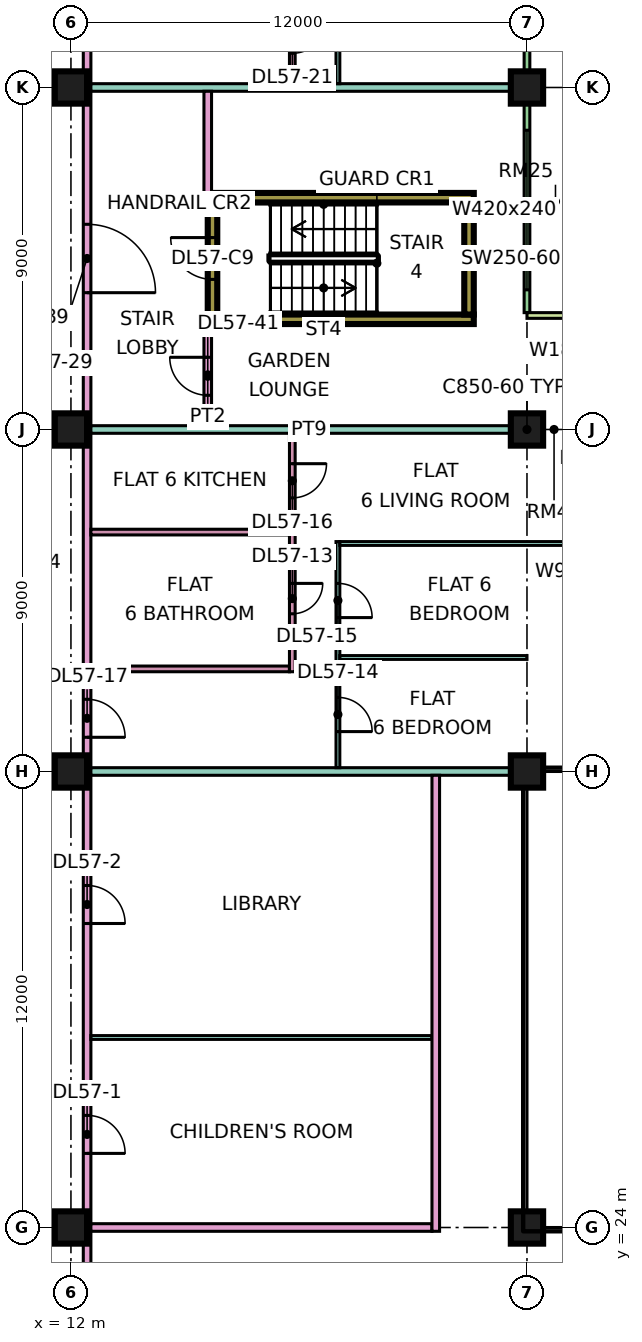
"""IFC4 building model, lengths in metres.
Left out: names, types, materials, properties, quantities, classifications, styles, units other than length and angle.
Written with IfcOpenShell. Run it as: python <this file> out.ifc"""

import sys

from ifc_helpers import new_model, si_unit, direction, frame, frame_2d, origin, origin_2d, place, context, subcontext, project, spatial, rectangle, extrude, element, fill, save


model = new_model("IFC4")
c1 = context("Model", 3, precision=1e-05, world=origin(), true_north=direction((0.0, 1.0)))
c2 = subcontext(c1, "Body", "Model", "MODEL_VIEW")
j1 = project(units=[si_unit("LENGTHUNIT", "METRE"), si_unit("PLANEANGLEUNIT", "RADIAN")], contexts=[c1])
p1 = place(None, origin())
s1 = spatial("IfcSite", under=j1, at=p1, CompositionType="ELEMENT")
p2 = place(p1, origin())
s2 = spatial("IfcBuilding", under=s1, at=p2, CompositionType="ELEMENT")
p3 = place(p2, frame((0.0, 0.0, 241.65)))
s3 = spatial("IfcBuildingStorey", under=s2, at=p3, CompositionType="ELEMENT", Elevation=241.65)
for number, where, z_axis, x_axis in (
    (1, (12.0, 24.0, 0.0), (0.0, 0.0, 1.0), (1.0, 0.0, 0.0)),
    (2, (12.0, 36.0, 0.0), (0.0, 0.0, 1.0), (1.0, 0.0, 0.0)),
    (3, (12.0, 45.0, 0.0), (0.0, 0.0, 1.0), (1.0, 0.0, 0.0)),
    (4, (12.0, 54.0, 0.0), (0.0, 0.0, 1.0), (1.0, 0.0, 0.0)),
    (5, (24.0, 24.0, 0.0), (0.0, 0.0, 1.0), (1.0, 0.0, 0.0)),
    (6, (24.0, 36.0, 0.0), (0.0, 0.0, 1.0), (1.0, 0.0, 0.0)),
    (7, (24.0, 45.0, 0.0), (0.0, 0.0, 1.0), (1.0, 0.0, 0.0)),
    (8, (24.0, 54.0, 0.0), (0.0, 0.0, 1.0), (1.0, 0.0, 0.0)),
):
    element("IfcColumn", number, at=place(p3, frame(where, z_axis=z_axis, x_axis=x_axis)), inside=s3, PredefinedType="COLUMN", context=c2, shape_type="SweptSolid", body=[
        extrude(rectangle(XDim=0.85, YDim=0.85, at=origin_2d()), origin(), (0.0, 0.0, 1.0), 3.75),
    ])
for number, where, z_axis, x_axis in (
    (9, (15.6, 47.9, 0.0), (0.0, 0.0, 1.0), (1.0, 0.0, 0.0)),
    (10, (15.6, 51.1, 0.0), (0.0, 0.0, 1.0), (1.0, 0.0, 0.0)),
):
    element("IfcWall", number, at=place(p3, frame(where, z_axis=z_axis, x_axis=x_axis)), inside=s3, PredefinedType="SHEAR", context=c2, shape_type="SweptSolid", body=[
        extrude(rectangle(XDim=7.0, YDim=0.25, at=frame_2d((3.5, 0.0))), origin(), (0.0, 0.0, 1.0), 3.75),
    ])
p4 = place(p3, frame((15.725, 48.025, 0.0), z_axis=(0.0, 0.0, 1.0), x_axis=(0.0, 1.0, 0.0)))
e11 = element("IfcWall", 11, at=p4, inside=s3, PredefinedType="SHEAR", context=c2, shape_type="SweptSolid", body=[
    extrude(rectangle(XDim=2.95, YDim=0.25, at=frame_2d((1.475, 0.0))), origin(), (0.0, 0.0, 1.0), 3.75),
])
p5 = place(p4, frame((0.925, 0.0, 0.0)))
e12 = element("IfcOpeningElement", 12, at=p5, cuts=e11, PredefinedType="OPENING", context=c2, shape_type="SweptSolid", body=[
    extrude(rectangle(XDim=1.1, YDim=2.2, at=frame_2d((0.55, 1.1))), frame((0.0, 0.135, 0.0), z_axis=(0.0, -1.0, 0.0), x_axis=(1.0, 0.0, 0.0)), (0.0, 0.0, 1.0), 0.27),
])
p6 = place(p3, frame((22.475, 48.025, 0.0), z_axis=(0.0, 0.0, 1.0), x_axis=(0.0, 1.0, 0.0)))
e13 = element("IfcWall", 13, at=p6, inside=s3, PredefinedType="SHEAR", context=c2, shape_type="SweptSolid", body=[
    extrude(rectangle(XDim=2.95, YDim=0.25, at=frame_2d((1.475, 0.0))), origin(), (0.0, 0.0, 1.0), 3.75),
])
p7 = place(p3, frame((24.0, 48.075, 0.0), z_axis=(0.0, 0.0, 1.0), x_axis=(0.0, 1.0, 0.0)))
e14 = element("IfcWall", 14, at=p7, inside=s3, PredefinedType="SOLIDWALL", context=c2, shape_type="SweptSolid", body=[
    extrude(rectangle(XDim=13.35, YDim=0.15, at=frame_2d((6.675, 0.0))), origin(), (0.0, 0.0, 1.0), 3.35),
])
p8 = place(p7, frame((0.6, 0.0, 0.45)))
e15 = element("IfcOpeningElement", 15, at=p8, cuts=e14, PredefinedType="OPENING", context=c2, shape_type="SweptSolid", body=[
    extrude(rectangle(XDim=4.2, YDim=2.4, at=frame_2d((2.1, 1.2))), frame((0.0, 0.085, 0.0), z_axis=(0.0, -1.0, 0.0), x_axis=(1.0, 0.0, 0.0)), (0.0, 0.0, 1.0), 0.17),
])
p9 = place(p7, frame((7.087, 0.0, 0.0)))
e16 = element("IfcOpeningElement", 16, at=p9, cuts=e14, PredefinedType="OPENING", context=c2, shape_type="SweptSolid", body=[
    extrude(rectangle(XDim=1.2, YDim=2.4, at=frame_2d((0.6, 1.2))), frame((0.0, 0.085, 0.0), z_axis=(0.0, -1.0, 0.0), x_axis=(1.0, 0.0, 0.0)), (0.0, 0.0, 1.0), 0.17),
])
p10 = place(p7, frame((9.525, 0.0, 0.45)))
e17 = element("IfcOpeningElement", 17, at=p10, cuts=e14, PredefinedType="OPENING", context=c2, shape_type="SweptSolid", body=[
    extrude(rectangle(XDim=1.8, YDim=2.4, at=frame_2d((0.9, 1.2))), frame((0.0, 0.085, 0.0), z_axis=(0.0, -1.0, 0.0), x_axis=(1.0, 0.0, 0.0)), (0.0, 0.0, 1.0), 0.17),
])
p11 = place(p7, frame((12.188, 0.0, 0.45)))
e18 = element("IfcOpeningElement", 18, at=p11, cuts=e14, PredefinedType="OPENING", context=c2, shape_type="SweptSolid", body=[
    extrude(rectangle(XDim=0.9, YDim=2.4, at=frame_2d((0.45, 1.2))), frame((0.0, 0.085, 0.0), z_axis=(0.0, -1.0, 0.0), x_axis=(1.0, 0.0, 0.0)), (0.0, 0.0, 1.0), 0.17),
])
p12 = place(p3, frame((25.5, 48.0, 0.0), z_axis=(0.0, 0.0, 1.0), x_axis=(-1.0, 0.0, 0.0)))
e19 = element("IfcWall", 19, at=p12, inside=s3, PredefinedType="SOLIDWALL", context=c2, shape_type="SweptSolid", body=[
    extrude(rectangle(XDim=1.5, YDim=0.15, at=frame_2d((0.75, 0.0))), origin(), (0.0, 0.0, 1.0), 3.35),
])
p13 = place(p3, frame((12.425, 20.0, 0.0), z_axis=(0.0, 0.0, 1.0), x_axis=(0.0, 1.0, 0.0)))
e20 = element("IfcWall", 20, at=p13, inside=s3, PredefinedType="PARTITIONING", context=c2, shape_type="SweptSolid", body=[
    extrude(rectangle(XDim=43.0, YDim=0.2, at=frame_2d((21.5, 0.0))), origin(), (0.0, 0.0, 1.0), 3.35),
])
p14 = place(p13, frame((5.95, 0.0, 0.0)))
e21 = element("IfcOpeningElement", 21, at=p14, cuts=e20, PredefinedType="OPENING", context=c2, shape_type="SweptSolid", body=[
    extrude(rectangle(XDim=1.0, YDim=2.1, at=frame_2d((0.5, 1.05))), frame((0.0, 0.11, 0.0), z_axis=(0.0, -1.0, 0.0), x_axis=(1.0, 0.0, 0.0)), (0.0, 0.0, 1.0), 0.22),
])
p15 = place(p13, frame((12.0, 0.0, 0.0)))
e22 = element("IfcOpeningElement", 22, at=p15, cuts=e20, PredefinedType="OPENING", context=c2, shape_type="SweptSolid", body=[
    extrude(rectangle(XDim=1.0, YDim=2.1, at=frame_2d((0.5, 1.05))), frame((0.0, 0.11, 0.0), z_axis=(0.0, -1.0, 0.0), x_axis=(1.0, 0.0, 0.0)), (0.0, 0.0, 1.0), 0.22),
])
p16 = place(p13, frame((16.9, 0.0, 0.0)))
e23 = element("IfcOpeningElement", 23, at=p16, cuts=e20, PredefinedType="OPENING", context=c2, shape_type="SweptSolid", body=[
    extrude(rectangle(XDim=1.0, YDim=2.1, at=frame_2d((0.5, 1.05))), frame((0.0, 0.11, 0.0), z_axis=(0.0, -1.0, 0.0), x_axis=(1.0, 0.0, 0.0)), (0.0, 0.0, 1.0), 0.22),
])
p17 = place(p13, frame((41.05, 0.0, 0.0)))
e24 = element("IfcOpeningElement", 24, at=p17, cuts=e20, PredefinedType="OPENING", context=c2, shape_type="SweptSolid", body=[
    extrude(rectangle(XDim=1.0, YDim=2.1, at=frame_2d((0.5, 1.05))), frame((0.0, 0.11, 0.0), z_axis=(0.0, -1.0, 0.0), x_axis=(1.0, 0.0, 0.0)), (0.0, 0.0, 1.0), 0.22),
])
p18 = place(p13, frame((1.15, 0.0, 0.0)))
e25 = element("IfcOpeningElement", 25, at=p18, cuts=e20, PredefinedType="OPENING", context=c2, shape_type="SweptSolid", body=[
    extrude(rectangle(XDim=1.8, YDim=2.1, at=frame_2d((0.9, 1.05))), frame((0.0, 0.11, 0.0), z_axis=(0.0, -1.0, 0.0), x_axis=(1.0, 0.0, 0.0)), (0.0, 0.0, 1.0), 0.22),
])
p19 = place(p13, frame((28.6, 0.0, 0.0)))
e26 = element("IfcOpeningElement", 26, at=p19, cuts=e20, PredefinedType="OPENING", context=c2, shape_type="SweptSolid", body=[
    extrude(rectangle(XDim=1.8, YDim=2.1, at=frame_2d((0.9, 1.05))), frame((0.0, 0.11, 0.0), z_axis=(0.0, -1.0, 0.0), x_axis=(1.0, 0.0, 0.0)), (0.0, 0.0, 1.0), 0.22),
])
p20 = place(p3, frame((12.525, 24.0, 0.0), z_axis=(0.0, 0.0, 1.0), x_axis=(1.0, 0.0, 0.0)))
e27 = element("IfcWall", 27, at=p20, inside=s3, PredefinedType="PARTITIONING", context=c2, shape_type="SweptSolid", body=[
    extrude(rectangle(XDim=8.975, YDim=0.2, at=frame_2d((4.488, 0.0))), origin(), (0.0, 0.0, 1.0), 3.35),
])
p21 = place(p3, frame((12.525, 29.0, 0.0), z_axis=(0.0, 0.0, 1.0), x_axis=(1.0, 0.0, 0.0)))
e28 = element("IfcWall", 28, at=p21, inside=s3, PredefinedType="PARTITIONING", context=c2, shape_type="SweptSolid", body=[
    extrude(rectangle(XDim=8.975, YDim=0.1, at=frame_2d((4.488, 0.0))), origin(), (0.0, 0.0, 1.0), 3.35),
])
p22 = place(p3, frame((12.525, 36.0, 0.0), z_axis=(0.0, 0.0, 1.0), x_axis=(1.0, 0.0, 0.0)))
e29 = element("IfcWall", 29, at=p22, inside=s3, PredefinedType="PARTITIONING", context=c2, shape_type="SweptSolid", body=[
    extrude(rectangle(XDim=11.475, YDim=0.2, at=frame_2d((5.738, 0.0))), origin(), (0.0, 0.0, 1.0), 3.35),
])
for number, where, z_axis, x_axis in (
    (30, (12.525, 38.7, 0.0), (0.0, 0.0, 1.0), (1.0, 0.0, 0.0)),
    (31, (12.525, 42.3, 0.0), (0.0, 0.0, 1.0), (1.0, 0.0, 0.0)),
):
    element("IfcWall", number, at=place(p3, frame(where, z_axis=z_axis, x_axis=x_axis)), inside=s3, PredefinedType="PARTITIONING", context=c2, shape_type="SweptSolid", body=[
        extrude(rectangle(XDim=5.225, YDim=0.15, at=frame_2d((2.613, 0.0))), origin(), (0.0, 0.0, 1.0), 3.35),
    ])
p23 = place(p3, frame((12.525, 45.0, 0.0), z_axis=(0.0, 0.0, 1.0), x_axis=(1.0, 0.0, 0.0)))
e32 = element("IfcWall", 32, at=p23, inside=s3, PredefinedType="PARTITIONING", context=c2, shape_type="SweptSolid", body=[
    extrude(rectangle(XDim=11.475, YDim=0.2, at=frame_2d((5.738, 0.0))), origin(), (0.0, 0.0, 1.0), 3.35),
])
p24 = place(p3, frame((12.525, 54.0, 0.0), z_axis=(0.0, 0.0, 1.0), x_axis=(1.0, 0.0, 0.0)))
e33 = element("IfcWall", 33, at=p24, inside=s3, PredefinedType="PARTITIONING", context=c2, shape_type="SweptSolid", body=[
    extrude(rectangle(XDim=11.401, YDim=0.2, at=frame_2d((5.701, 0.0))), origin(), (0.0, 0.0, 1.0), 3.35),
])
p25 = place(p3, frame((15.6, 45.1, 0.0), z_axis=(0.0, 0.0, 1.0), x_axis=(0.0, 1.0, 0.0)))
e34 = element("IfcWall", 34, at=p25, inside=s3, PredefinedType="PARTITIONING", context=c2, shape_type="SweptSolid", body=[
    extrude(rectangle(XDim=2.675, YDim=0.2, at=frame_2d((1.337, 0.0))), origin(), (0.0, 0.0, 1.0), 3.35),
])
p26 = place(p25, frame((0.8, 0.0, 0.0)))
e35 = element("IfcOpeningElement", 35, at=p26, cuts=e34, PredefinedType="OPENING", context=c2, shape_type="SweptSolid", body=[
    extrude(rectangle(XDim=1.0, YDim=2.1, at=frame_2d((0.5, 1.05))), frame((0.0, 0.11, 0.0), z_axis=(0.0, -1.0, 0.0), x_axis=(1.0, 0.0, 0.0)), (0.0, 0.0, 1.0), 0.22),
])
p27 = place(p3, frame((15.6, 51.225, 0.0), z_axis=(0.0, 0.0, 1.0), x_axis=(0.0, 1.0, 0.0)))
e36 = element("IfcWall", 36, at=p27, inside=s3, PredefinedType="PARTITIONING", context=c2, shape_type="SweptSolid", body=[
    extrude(rectangle(XDim=2.675, YDim=0.2, at=frame_2d((1.337, 0.0))), origin(), (0.0, 0.0, 1.0), 3.35),
])
p28 = place(p3, frame((17.825, 38.625, 0.0), z_axis=(0.0, 0.0, 1.0), x_axis=(0.0, 1.0, 0.0)))
e37 = element("IfcWall", 37, at=p28, inside=s3, PredefinedType="PARTITIONING", context=c2, shape_type="SweptSolid", body=[
    extrude(rectangle(XDim=6.275, YDim=0.15, at=frame_2d((3.137, 0.0))), origin(), (0.0, 0.0, 1.0), 3.35),
])
p29 = place(p28, frame((1.525, 0.0, 0.0)))
e38 = element("IfcOpeningElement", 38, at=p29, cuts=e37, PredefinedType="OPENING", context=c2, shape_type="SweptSolid", body=[
    extrude(rectangle(XDim=0.8, YDim=2.1, at=frame_2d((0.4, 1.05))), frame((0.0, 0.085, 0.0), z_axis=(0.0, -1.0, 0.0), x_axis=(1.0, 0.0, 0.0)), (0.0, 0.0, 1.0), 0.17),
])
p30 = place(p28, frame((4.575, 0.0, 0.0)))
e39 = element("IfcOpeningElement", 39, at=p30, cuts=e37, PredefinedType="OPENING", context=c2, shape_type="SweptSolid", body=[
    extrude(rectangle(XDim=0.9, YDim=2.1, at=frame_2d((0.45, 1.05))), frame((0.0, 0.085, 0.0), z_axis=(0.0, -1.0, 0.0), x_axis=(1.0, 0.0, 0.0)), (0.0, 0.0, 1.0), 0.17),
])
p31 = place(p3, frame((17.825, 54.1, 0.0), z_axis=(0.0, 0.0, 1.0), x_axis=(0.0, 1.0, 0.0)))
e40 = element("IfcWall", 40, at=p31, inside=s3, PredefinedType="PARTITIONING", context=c2, shape_type="SweptSolid", body=[
    extrude(rectangle(XDim=5.975, YDim=0.15, at=frame_2d((2.987, 0.0))), origin(), (0.0, 0.0, 1.0), 3.35),
])
p32 = place(p31, frame((3.9, 0.0, 0.0)))
e41 = element("IfcOpeningElement", 41, at=p32, cuts=e40, PredefinedType="OPENING", context=c2, shape_type="SweptSolid", body=[
    extrude(rectangle(XDim=0.8, YDim=2.1, at=frame_2d((0.4, 1.05))), frame((0.0, 0.085, 0.0), z_axis=(0.0, -1.0, 0.0), x_axis=(1.0, 0.0, 0.0)), (0.0, 0.0, 1.0), 0.17),
])
p33 = place(p31, frame((0.8, 0.0, 0.0)))
e42 = element("IfcOpeningElement", 42, at=p33, cuts=e40, PredefinedType="OPENING", context=c2, shape_type="SweptSolid", body=[
    extrude(rectangle(XDim=0.9, YDim=2.1, at=frame_2d((0.45, 1.05))), frame((0.0, 0.085, 0.0), z_axis=(0.0, -1.0, 0.0), x_axis=(1.0, 0.0, 0.0)), (0.0, 0.0, 1.0), 0.17),
])
p34 = place(p3, frame((19.025, 36.1, 0.0), z_axis=(0.0, 0.0, 1.0), x_axis=(0.0, 1.0, 0.0)))
e43 = element("IfcWall", 43, at=p34, inside=s3, PredefinedType="PARTITIONING", context=c2, shape_type="SweptSolid", body=[
    extrude(rectangle(XDim=5.95, YDim=0.1, at=frame_2d((2.975, 0.0))), origin(), (0.0, 0.0, 1.0), 3.35),
])
p35 = place(p34, frame((0.95, 0.0, 0.0)))
e44 = element("IfcOpeningElement", 44, at=p35, cuts=e43, PredefinedType="OPENING", context=c2, shape_type="SweptSolid", body=[
    extrude(rectangle(XDim=0.9, YDim=2.1, at=frame_2d((0.45, 1.05))), frame((0.0, 0.06, 0.0), z_axis=(0.0, -1.0, 0.0), x_axis=(1.0, 0.0, 0.0)), (0.0, 0.0, 1.0), 0.12),
])
p36 = place(p34, frame((3.95, 0.0, 0.0)))
e45 = element("IfcOpeningElement", 45, at=p36, cuts=e43, PredefinedType="OPENING", context=c2, shape_type="SweptSolid", body=[
    extrude(rectangle(XDim=0.9, YDim=2.1, at=frame_2d((0.45, 1.05))), frame((0.0, 0.06, 0.0), z_axis=(0.0, -1.0, 0.0), x_axis=(1.0, 0.0, 0.0)), (0.0, 0.0, 1.0), 0.12),
])
p37 = place(p3, frame((19.025, 54.1, 0.0), z_axis=(0.0, 0.0, 1.0), x_axis=(0.0, 1.0, 0.0)))
e46 = element("IfcWall", 46, at=p37, inside=s3, PredefinedType="PARTITIONING", context=c2, shape_type="SweptSolid", body=[
    extrude(rectangle(XDim=2.85, YDim=0.1, at=frame_2d((1.425, 0.0))), origin(), (0.0, 0.0, 1.0), 3.35),
])
p38 = place(p37, frame((0.95, 0.0, 0.0)))
e47 = element("IfcOpeningElement", 47, at=p38, cuts=e46, PredefinedType="OPENING", context=c2, shape_type="SweptSolid", body=[
    extrude(rectangle(XDim=0.9, YDim=2.1, at=frame_2d((0.45, 1.05))), frame((0.0, 0.06, 0.0), z_axis=(0.0, -1.0, 0.0), x_axis=(1.0, 0.0, 0.0)), (0.0, 0.0, 1.0), 0.12),
])
p39 = place(p3, frame((19.075, 39.0, 0.0), z_axis=(0.0, 0.0, 1.0), x_axis=(1.0, 0.0, 0.0)))
e48 = element("IfcWall", 48, at=p39, inside=s3, PredefinedType="PARTITIONING", context=c2, shape_type="SweptSolid", body=[
    extrude(rectangle(XDim=4.925, YDim=0.1, at=frame_2d((2.462, 0.0))), origin(), (0.0, 0.0, 1.0), 3.35),
])
p40 = place(p3, frame((19.075, 42.0, 0.0), z_axis=(0.0, 0.0, 1.0), x_axis=(1.0, 0.0, 0.0)))
e49 = element("IfcWall", 49, at=p40, inside=s3, PredefinedType="PARTITIONING", context=c2, shape_type="SweptSolid", body=[
    extrude(rectangle(XDim=6.275, YDim=0.1, at=frame_2d((3.138, 0.0))), origin(), (0.0, 0.0, 1.0), 3.35),
])
p41 = place(p3, frame((21.6, 23.9, 0.0), z_axis=(0.0, 0.0, 1.0), x_axis=(0.0, 1.0, 0.0)))
e50 = element("IfcWall", 50, at=p41, inside=s3, PredefinedType="PARTITIONING", context=c2, shape_type="SweptSolid", body=[
    extrude(rectangle(XDim=12.0, YDim=0.2, at=frame_2d((6.0, 0.0))), origin(), (0.0, 0.0, 1.0), 3.35),
])
p42 = place(p8, origin())
e51 = element("IfcWindow", 51, at=p42, inside=s3, PartitioningType="SINGLE_PANEL", PredefinedType="WINDOW", context=c2, shape_type="SweptSolid", body=[
    extrude(rectangle(XDim=4.2, YDim=2.4, at=frame_2d((2.1, 1.2))), frame((0.0, 0.03, 0.0), z_axis=(0.0, -1.0, 0.0), x_axis=(1.0, 0.0, 0.0)), (0.0, 0.0, 1.0), 0.06),
])
fill(e15, e51)
p43 = place(p5, frame((1.1, 0.0, 0.0), z_axis=(0.0, 0.0, 1.0), x_axis=(-1.0, 0.0, 0.0)))
e52 = element("IfcDoor", 52, at=p43, inside=s3, OperationType="SINGLE_SWING_RIGHT", PredefinedType="DOOR", context=c2, shape_type="SweptSolid", body=[
    extrude(rectangle(XDim=1.1, YDim=2.2, at=frame_2d((0.55, 1.1))), frame((0.0, 0.025, 0.0), z_axis=(0.0, -1.0, 0.0), x_axis=(1.0, 0.0, 0.0)), (0.0, 0.0, 1.0), 0.05),
])
fill(e12, e52)
p44 = place(p14, frame((1.0, 0.0, 0.0), z_axis=(0.0, 0.0, 1.0), x_axis=(-1.0, 0.0, 0.0)))
e53 = element("IfcDoor", 53, at=p44, inside=s3, OperationType="SINGLE_SWING_LEFT", PredefinedType="DOOR", context=c2, shape_type="SweptSolid", body=[
    extrude(rectangle(XDim=1.0, YDim=2.1, at=frame_2d((0.5, 1.05))), frame((0.0, 0.025, 0.0), z_axis=(0.0, -1.0, 0.0), x_axis=(1.0, 0.0, 0.0)), (0.0, 0.0, 1.0), 0.05),
])
fill(e21, e53)
p45 = place(p15, frame((1.0, 0.0, 0.0), z_axis=(0.0, 0.0, 1.0), x_axis=(-1.0, 0.0, 0.0)))
e54 = element("IfcDoor", 54, at=p45, inside=s3, OperationType="SINGLE_SWING_LEFT", PredefinedType="DOOR", context=c2, shape_type="SweptSolid", body=[
    extrude(rectangle(XDim=1.0, YDim=2.1, at=frame_2d((0.5, 1.05))), frame((0.0, 0.025, 0.0), z_axis=(0.0, -1.0, 0.0), x_axis=(1.0, 0.0, 0.0)), (0.0, 0.0, 1.0), 0.05),
])
fill(e22, e54)
p46 = place(p29, origin())
e55 = element("IfcDoor", 55, at=p46, inside=s3, OperationType="SINGLE_SWING_RIGHT", PredefinedType="DOOR", context=c2, shape_type="SweptSolid", body=[
    extrude(rectangle(XDim=0.8, YDim=2.1, at=frame_2d((0.4, 1.05))), frame((0.0, 0.025, 0.0), z_axis=(0.0, -1.0, 0.0), x_axis=(1.0, 0.0, 0.0)), (0.0, 0.0, 1.0), 0.05),
])
fill(e38, e55)
p47 = place(p35, frame((0.9, 0.0, 0.0), z_axis=(0.0, 0.0, 1.0), x_axis=(-1.0, 0.0, 0.0)))
e56 = element("IfcDoor", 56, at=p47, inside=s3, OperationType="SINGLE_SWING_LEFT", PredefinedType="DOOR", context=c2, shape_type="SweptSolid", body=[
    extrude(rectangle(XDim=0.9, YDim=2.1, at=frame_2d((0.45, 1.05))), frame((0.0, 0.025, 0.0), z_axis=(0.0, -1.0, 0.0), x_axis=(1.0, 0.0, 0.0)), (0.0, 0.0, 1.0), 0.05),
])
fill(e44, e56)
p48 = place(p36, frame((0.9, 0.0, 0.0), z_axis=(0.0, 0.0, 1.0), x_axis=(-1.0, 0.0, 0.0)))
e57 = element("IfcDoor", 57, at=p48, inside=s3, OperationType="SINGLE_SWING_LEFT", PredefinedType="DOOR", context=c2, shape_type="SweptSolid", body=[
    extrude(rectangle(XDim=0.9, YDim=2.1, at=frame_2d((0.45, 1.05))), frame((0.0, 0.025, 0.0), z_axis=(0.0, -1.0, 0.0), x_axis=(1.0, 0.0, 0.0)), (0.0, 0.0, 1.0), 0.05),
])
fill(e45, e57)
p49 = place(p30, origin())
e58 = element("IfcDoor", 58, at=p49, inside=s3, OperationType="SINGLE_SWING_RIGHT", PredefinedType="DOOR", context=c2, shape_type="SweptSolid", body=[
    extrude(rectangle(XDim=0.9, YDim=2.1, at=frame_2d((0.45, 1.05))), frame((0.0, 0.025, 0.0), z_axis=(0.0, -1.0, 0.0), x_axis=(1.0, 0.0, 0.0)), (0.0, 0.0, 1.0), 0.05),
])
fill(e39, e58)
p50 = place(p16, frame((1.0, 0.0, 0.0), z_axis=(0.0, 0.0, 1.0), x_axis=(-1.0, 0.0, 0.0)))
e59 = element("IfcDoor", 59, at=p50, inside=s3, OperationType="SINGLE_SWING_LEFT", PredefinedType="DOOR", context=c2, shape_type="SweptSolid", body=[
    extrude(rectangle(XDim=1.0, YDim=2.1, at=frame_2d((0.5, 1.05))), frame((0.0, 0.025, 0.0), z_axis=(0.0, -1.0, 0.0), x_axis=(1.0, 0.0, 0.0)), (0.0, 0.0, 1.0), 0.05),
])
fill(e23, e59)
p51 = place(p33, origin())
e60 = element("IfcDoor", 60, at=p51, inside=s3, OperationType="SINGLE_SWING_RIGHT", PredefinedType="DOOR", context=c2, shape_type="SweptSolid", body=[
    extrude(rectangle(XDim=0.9, YDim=2.1, at=frame_2d((0.45, 1.05))), frame((0.0, 0.025, 0.0), z_axis=(0.0, -1.0, 0.0), x_axis=(1.0, 0.0, 0.0)), (0.0, 0.0, 1.0), 0.05),
])
fill(e42, e60)
p52 = place(p19, frame((1.8, 0.0, 0.0), z_axis=(0.0, 0.0, 1.0), x_axis=(-1.0, 0.0, 0.0)))
e61 = element("IfcDoor", 61, at=p52, inside=s3, OperationType="DOUBLE_DOOR_SINGLE_SWING", PredefinedType="DOOR", context=c2, shape_type="SweptSolid", body=[
    extrude(rectangle(XDim=1.8, YDim=2.1, at=frame_2d((0.9, 1.05))), frame((0.0, 0.025, 0.0), z_axis=(0.0, -1.0, 0.0), x_axis=(1.0, 0.0, 0.0)), (0.0, 0.0, 1.0), 0.05),
])
fill(e26, e61)
p53 = place(p26, frame((1.0, 0.0, 0.0), z_axis=(0.0, 0.0, 1.0), x_axis=(-1.0, 0.0, 0.0)))
e62 = element("IfcDoor", 62, at=p53, inside=s3, OperationType="SINGLE_SWING_RIGHT", PredefinedType="DOOR", context=c2, shape_type="SweptSolid", body=[
    extrude(rectangle(XDim=1.0, YDim=2.1, at=frame_2d((0.5, 1.05))), frame((0.0, 0.025, 0.0), z_axis=(0.0, -1.0, 0.0), x_axis=(1.0, 0.0, 0.0)), (0.0, 0.0, 1.0), 0.05),
])
fill(e35, e62)
save(model, sys.argv[1])
